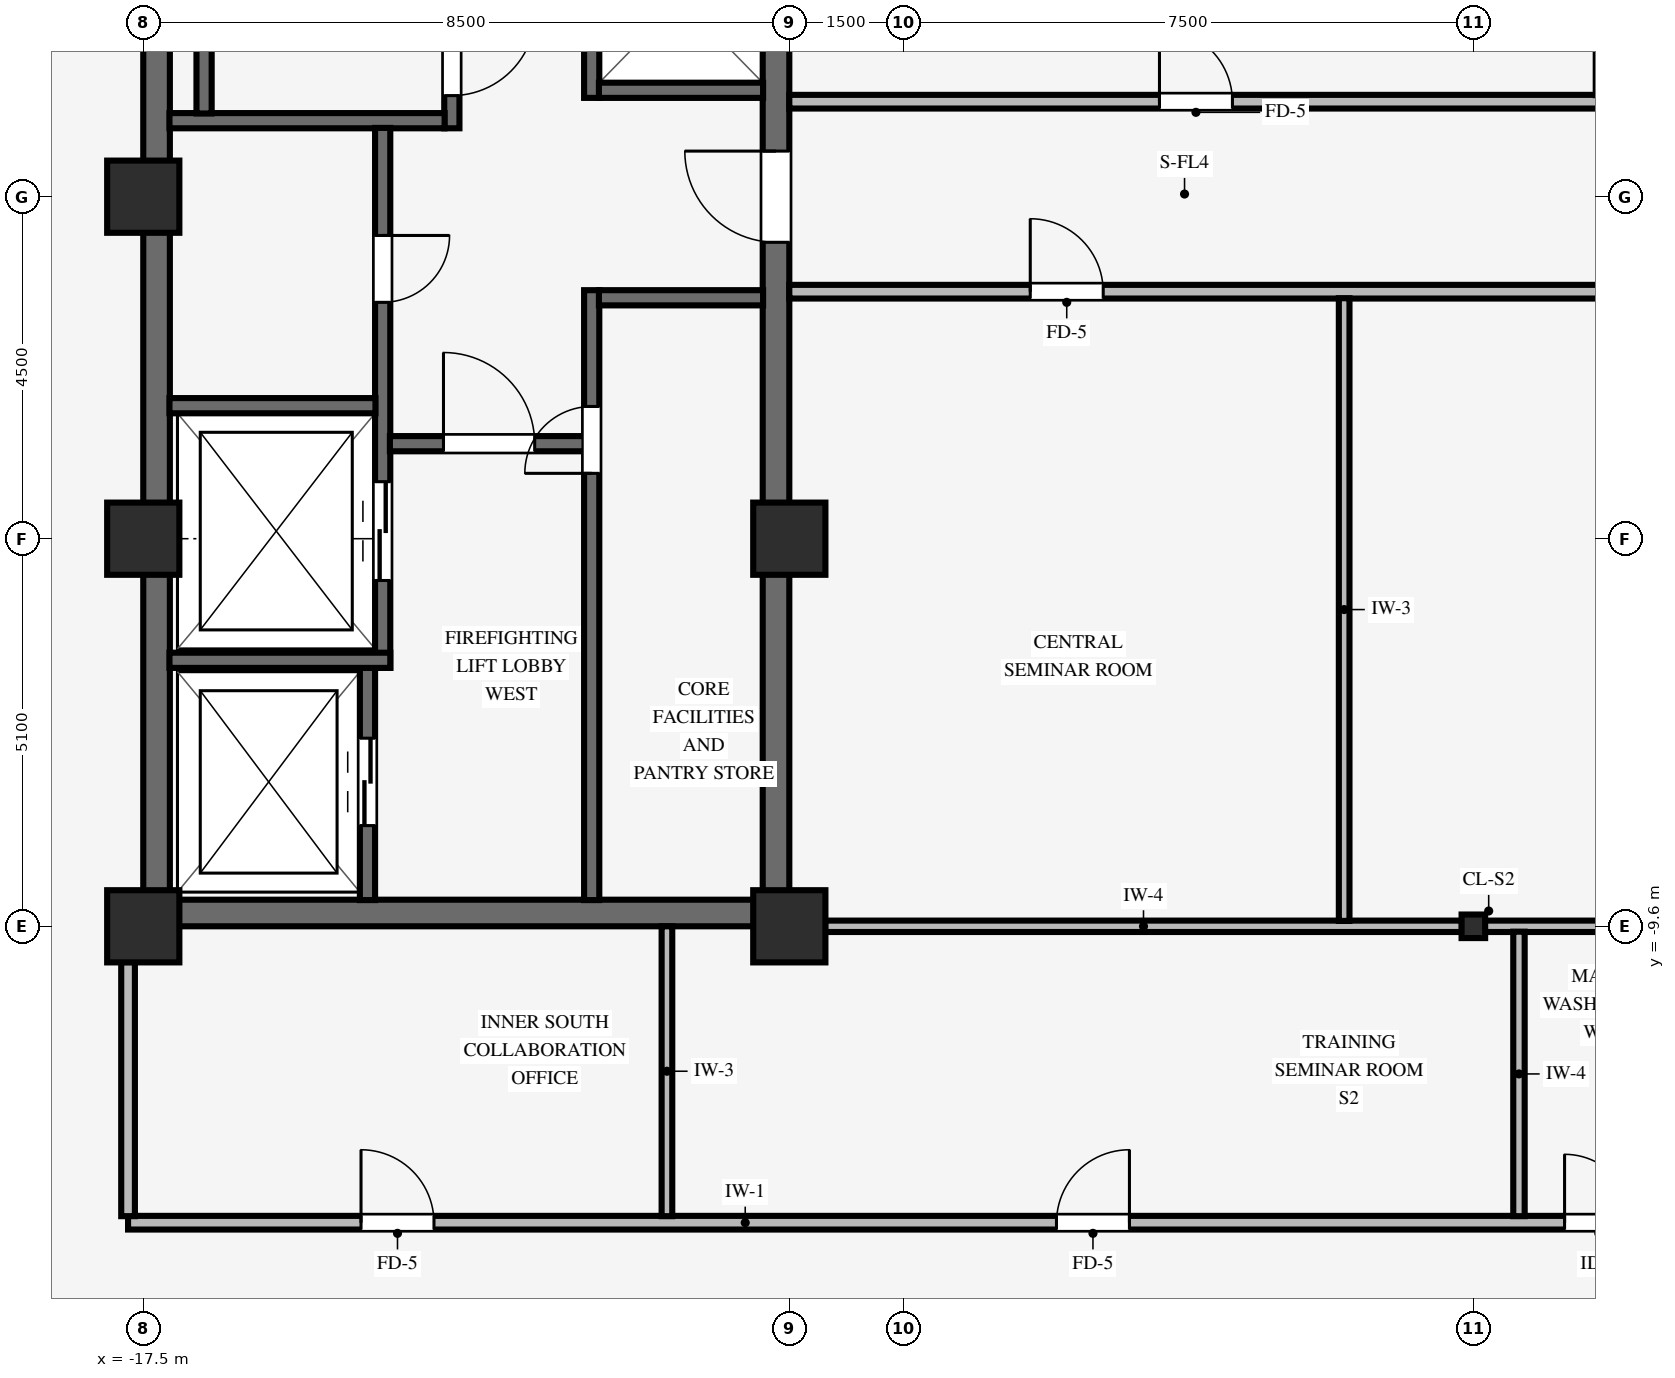
"""IFC4 building model, lengths in metres.
Left out: names, types, materials, properties, quantities, classifications, styles, units other than length and angle.
Written with IfcOpenShell. Run it as: python <this file> out.ifc"""

import sys

from ifc_helpers import new_model, si_unit, direction, frame, frame_2d, origin, origin_2d, place, context, subcontext, project, spatial, rectangle, i_section, extrude, source, transform, mapped, element, fill, save


model = new_model("IFC4")
c1 = context("Model", 3, precision=1e-05, world=origin(), true_north=direction((0.0, 1.0)))
c2 = subcontext(c1, "Body", "Model", "MODEL_VIEW")
j1 = project(units=[si_unit("LENGTHUNIT", "METRE"), si_unit("PLANEANGLEUNIT", "RADIAN")], contexts=[c1])
p1 = place(None, origin())
s1 = spatial("IfcSite", under=j1, at=p1, CompositionType="ELEMENT")
p2 = place(p1, origin())
s2 = spatial("IfcBuilding", under=s1, at=p2, CompositionType="ELEMENT")
p3 = place(p2, frame((0.0, 0.0, 216.45)))
s3 = spatial("IfcBuildingStorey", under=s2, at=p3, CompositionType="ELEMENT", Elevation=216.45)
p4 = place(p3, frame((-17.5, -9.425, 0.0), z_axis=(0.0, 0.0, 1.0), x_axis=(1.0, 0.0, 0.0)))
e1 = element("IfcWall", 1, at=p4, inside=s3, PredefinedType="SHEAR", context=c2, shape_type="SweptSolid", body=[
    extrude(rectangle(XDim=8.5, YDim=0.35, at=frame_2d((4.25, 0.0))), origin(), (0.0, 0.0, 1.0), 3.37),
])
p5 = place(p3, frame((-17.325, -9.255, 0.0), z_axis=(0.0, 0.0, 1.0), x_axis=(0.0, 1.0, 0.0)))
e2 = element("IfcWall", 2, at=p5, inside=s3, PredefinedType="SHEAR", context=c2, shape_type="SweptSolid", body=[
    extrude(rectangle(XDim=18.51, YDim=0.35, at=frame_2d((9.255, 0.0))), origin(), (0.0, 0.0, 1.0), 3.37),
])
p6 = place(p3, frame((-9.175, -9.255, 0.0), z_axis=(0.0, 0.0, 1.0), x_axis=(0.0, 1.0, 0.0)))
e3 = element("IfcWall", 3, at=p6, inside=s3, PredefinedType="SHEAR", context=c2, shape_type="SweptSolid", body=[
    extrude(rectangle(XDim=18.51, YDim=0.35, at=frame_2d((9.255, 0.0))), origin(), (0.0, 0.0, 1.0), 3.37),
])
p7 = place(p6, frame((8.655, 0.0, 0.0)))
e4 = element("IfcOpeningElement", 4, at=p7, cuts=e3, PredefinedType="OPENING", context=c2, shape_type="SweptSolid", body=[
    extrude(rectangle(XDim=1.2, YDim=2.15, at=frame_2d((0.6, 1.075))), frame((0.0, 0.185, 0.0), z_axis=(0.0, -1.0, 0.0), x_axis=(1.0, 0.0, 0.0)), (0.0, 0.0, 1.0), 0.37),
])
for number, where, z_axis, x_axis in (
    (5, (-17.5, -9.6, 0.0), (0.0, 0.0, 1.0), (1.0, 0.0, 0.0)),
    (6, (-17.5, -4.5, 0.0), (0.0, 0.0, 1.0), (1.0, 0.0, 0.0)),
    (7, (-9.0, -9.6, 0.0), (0.0, 0.0, 1.0), (1.0, 0.0, 0.0)),
    (8, (-9.0, -4.5, 0.0), (0.0, 0.0, 1.0), (1.0, 0.0, 0.0)),
    (9, (-17.5, 0.0, 0.0), (0.0, 0.0, 1.0), (1.0, 0.0, 0.0)),
):
    element("IfcColumn", number, at=place(p3, frame(where, z_axis=z_axis, x_axis=x_axis)), inside=s3, PredefinedType="COLUMN", context=c2, shape_type="SweptSolid", body=[
        extrude(rectangle(XDim=0.95, YDim=0.95, at=origin_2d()), origin(), (0.0, 0.0, 1.0), 3.37),
    ])
p8 = place(p3, frame((0.0, -9.6, 0.0), z_axis=(0.0, 0.0, 1.0), x_axis=(1.0, 0.0, 0.0)))
e10 = element("IfcColumn", 10, at=p8, inside=s3, PredefinedType="COLUMN", context=c2, shape_type="SweptSolid", body=[
    extrude(i_section(OverallWidth=0.31, OverallDepth=0.31, WebThickness=0.015, FlangeThickness=0.015, FilletRadius=0.015, at=origin_2d()), origin(), (0.0, 0.0, 1.0), 3.37),
])
p9 = place(p3, frame((-13.44, 0.9, 0.0), z_axis=(0.0, 0.0, 1.0), x_axis=(0.0, 1.0, 0.0)))
e11 = element("IfcWall", 11, at=p9, inside=s3, PredefinedType="SHEAR", context=c2, shape_type="SweptSolid", body=[
    extrude(rectangle(XDim=8.355, YDim=0.2, at=frame_2d((4.177, 0.0))), origin(), (0.0, 0.0, 1.0), 3.37),
])
p10 = place(p9, frame((1.53, 0.0, 0.0), z_axis=(0.0, 0.0, 1.0), x_axis=(-1.0, 0.0, 0.0)))
e12 = element("IfcOpeningElement", 12, at=p10, cuts=e11, PredefinedType="OPENING", context=c2, shape_type="SweptSolid", body=[
    extrude(rectangle(XDim=1.1, YDim=2.15, at=frame_2d((0.55, 1.075))), frame((0.0, 0.11, 0.0), z_axis=(0.0, -1.0, 0.0), x_axis=(1.0, 0.0, 0.0)), (0.0, 0.0, 1.0), 0.22),
])
p11 = place(p3, frame((-17.155, 1.0, 0.0), z_axis=(0.0, 0.0, 1.0), x_axis=(1.0, 0.0, 0.0)))
e13 = element("IfcWall", 13, at=p11, inside=s3, PredefinedType="SHEAR", context=c2, shape_type="SweptSolid", body=[
    extrude(rectangle(XDim=3.62, YDim=0.2, at=frame_2d((1.81, 0.0))), origin(), (0.0, 0.0, 1.0), 3.37),
])
p12 = place(p3, frame((-16.7, 1.095, 0.0), z_axis=(0.0, 0.0, 1.0), x_axis=(0.0, 1.0, 0.0)))
e14 = element("IfcWall", 14, at=p12, inside=s3, PredefinedType="SHEAR", context=c2, shape_type="SweptSolid", body=[
    extrude(rectangle(XDim=8.16, YDim=0.2, at=frame_2d((4.08, 0.0))), origin(), (0.0, 0.0, 1.0), 3.37),
])
p13 = place(p3, frame((-14.55, -9.255, 0.0), z_axis=(0.0, 0.0, 1.0), x_axis=(0.0, 1.0, 0.0)))
e15 = element("IfcWall", 15, at=p13, inside=s3, PredefinedType="SHEAR", context=c2, shape_type="SweptSolid", body=[
    extrude(rectangle(XDim=3.06, YDim=0.2, at=frame_2d((1.53, 0.0))), origin(), (0.0, 0.0, 1.0), 3.37),
])
p14 = place(p13, frame((0.98, 0.0, 0.0)))
e16 = element("IfcOpeningElement", 16, at=p14, cuts=e15, PredefinedType="OPENING", context=c2, shape_type="SweptSolid", body=[
    extrude(rectangle(XDim=1.15, YDim=2.15, at=frame_2d((0.575, 1.075))), frame((0.0, 0.11, 0.0), z_axis=(0.0, -1.0, 0.0), x_axis=(1.0, 0.0, 0.0)), (0.0, 0.0, 1.0), 0.22),
])
p15 = place(p3, frame((-14.35, -6.2, 0.0), z_axis=(0.0, 0.0, 1.0), x_axis=(0.0, 1.0, 0.0)))
e17 = element("IfcWall", 17, at=p15, inside=s3, PredefinedType="SHEAR", context=c2, shape_type="SweptSolid", body=[
    extrude(rectangle(XDim=7.105, YDim=0.2, at=frame_2d((3.552, 0.0))), origin(), (0.0, 0.0, 1.0), 3.37),
])
p16 = place(p15, frame((5.69, 0.0, 0.0), z_axis=(0.0, 0.0, 1.0), x_axis=(-1.0, 0.0, 0.0)))
e18 = element("IfcOpeningElement", 18, at=p16, cuts=e17, PredefinedType="OPENING", context=c2, shape_type="SweptSolid", body=[
    extrude(rectangle(XDim=0.88, YDim=2.1, at=frame_2d((0.44, 1.05))), frame((0.0, 0.11, 0.0), z_axis=(0.0, -1.0, 0.0), x_axis=(1.0, 0.0, 0.0)), (0.0, 0.0, 1.0), 0.22),
])
p17 = place(p15, frame((1.15, 0.0, 0.0)))
e19 = element("IfcOpeningElement", 19, at=p17, cuts=e17, PredefinedType="OPENING", context=c2, shape_type="SweptSolid", body=[
    extrude(rectangle(XDim=1.3, YDim=2.2, at=frame_2d((0.65, 1.1))), frame((0.0, 0.11, 0.0), z_axis=(0.0, -1.0, 0.0), x_axis=(1.0, 0.0, 0.0)), (0.0, 0.0, 1.0), 0.22),
])
p18 = place(p3, frame((-17.155, -6.1, 0.0), z_axis=(0.0, 0.0, 1.0), x_axis=(1.0, 0.0, 0.0)))
e20 = element("IfcWall", 20, at=p18, inside=s3, PredefinedType="SHEAR", context=c2, shape_type="SweptSolid", body=[
    extrude(rectangle(XDim=2.905, YDim=0.2, at=frame_2d((1.453, 0.0))), origin(), (0.0, 0.0, 1.0), 3.37),
])
p19 = place(p3, frame((-17.155, -2.75, 0.0), z_axis=(0.0, 0.0, 1.0), x_axis=(1.0, 0.0, 0.0)))
e21 = element("IfcWall", 21, at=p19, inside=s3, PredefinedType="SHEAR", context=c2, shape_type="SweptSolid", body=[
    extrude(rectangle(XDim=2.71, YDim=0.2, at=frame_2d((1.355, 0.0))), origin(), (0.0, 0.0, 1.0), 3.37),
])
p20 = place(p3, frame((-11.6, -9.255, 0.0), z_axis=(0.0, 0.0, 1.0), x_axis=(0.0, 1.0, 0.0)))
e22 = element("IfcWall", 22, at=p20, inside=s3, PredefinedType="SHEAR", context=c2, shape_type="SweptSolid", body=[
    extrude(rectangle(XDim=8.025, YDim=0.2, at=frame_2d((4.012, 0.0))), origin(), (0.0, 0.0, 1.0), 3.37),
])
p21 = place(p20, frame((5.615, 0.0, 0.0)))
e23 = element("IfcOpeningElement", 23, at=p21, cuts=e22, PredefinedType="OPENING", context=c2, shape_type="SweptSolid", body=[
    extrude(rectangle(XDim=0.88, YDim=2.1, at=frame_2d((0.44, 1.05))), frame((0.0, 0.11, 0.0), z_axis=(0.0, -1.0, 0.0), x_axis=(1.0, 0.0, 0.0)), (0.0, 0.0, 1.0), 0.22),
])
p22 = place(p3, frame((-14.255, -3.25, 0.0), z_axis=(0.0, 0.0, 1.0), x_axis=(1.0, 0.0, 0.0)))
e24 = element("IfcWall", 24, at=p22, inside=s3, PredefinedType="SHEAR", context=c2, shape_type="SweptSolid", body=[
    extrude(rectangle(XDim=2.56, YDim=0.2, at=frame_2d((1.28, 0.0))), origin(), (0.0, 0.0, 1.0), 3.37),
])
p23 = place(p22, frame((0.705, 0.0, 0.0)))
e25 = element("IfcOpeningElement", 25, at=p23, cuts=e24, PredefinedType="OPENING", context=c2, shape_type="SweptSolid", body=[
    extrude(rectangle(XDim=1.2, YDim=2.15, at=frame_2d((0.6, 1.075))), frame((0.0, 0.11, 0.0), z_axis=(0.0, -1.0, 0.0), x_axis=(1.0, 0.0, 0.0)), (0.0, 0.0, 1.0), 0.22),
])
p24 = place(p3, frame((-11.505, -1.33, 0.0), z_axis=(0.0, 0.0, 1.0), x_axis=(1.0, 0.0, 0.0)))
e26 = element("IfcWall", 26, at=p24, inside=s3, PredefinedType="SHEAR", context=c2, shape_type="SweptSolid", body=[
    extrude(rectangle(XDim=2.16, YDim=0.2, at=frame_2d((1.08, 0.0))), origin(), (0.0, 0.0, 1.0), 3.37),
])
p25 = place(p3, frame((-11.6, 1.3, 0.0), z_axis=(0.0, 0.0, 1.0), x_axis=(0.0, 1.0, 0.0)))
e27 = element("IfcWall", 27, at=p25, inside=s3, PredefinedType="SHEAR", context=c2, shape_type="SweptSolid", body=[
    extrude(rectangle(XDim=7.955, YDim=0.2, at=frame_2d((3.978, 0.0))), origin(), (0.0, 0.0, 1.0), 3.37),
])
p26 = place(p3, frame((-11.505, 1.4, 0.0), z_axis=(0.0, 0.0, 1.0), x_axis=(1.0, 0.0, 0.0)))
e28 = element("IfcWall", 28, at=p26, inside=s3, PredefinedType="SHEAR", context=c2, shape_type="SweptSolid", body=[
    extrude(rectangle(XDim=2.16, YDim=0.2, at=frame_2d((1.08, 0.0))), origin(), (0.0, 0.0, 1.0), 3.37),
])
p27 = place(p3, frame((-17.7, -13.5, 0.0), z_axis=(0.0, 0.0, 1.0), x_axis=(1.0, 0.0, 0.0)))
e29 = element("IfcWall", 29, at=p27, inside=s3, PredefinedType="PARTITIONING", context=c2, shape_type="SweptSolid", body=[
    extrude(rectangle(XDim=24.3, YDim=0.18, at=frame_2d((12.15, 0.0))), origin(), (0.0, 0.0, 1.0), 3.008),
])
p28 = place(p27, frame((12.215, 0.0, 0.0)))
e30 = element("IfcOpeningElement", 30, at=p28, cuts=e29, PredefinedType="OPENING", context=c2, shape_type="SweptSolid", body=[
    extrude(rectangle(XDim=0.96, YDim=2.1, at=frame_2d((0.48, 1.05))), frame((0.0, 0.1, 0.0), z_axis=(0.0, -1.0, 0.0), x_axis=(1.0, 0.0, 0.0)), (0.0, 0.0, 1.0), 0.2),
])
p29 = place(p27, frame((3.065, 0.0, 0.0)))
e31 = element("IfcOpeningElement", 31, at=p29, cuts=e29, PredefinedType="OPENING", context=c2, shape_type="SweptSolid", body=[
    extrude(rectangle(XDim=0.96, YDim=2.1, at=frame_2d((0.48, 1.05))), frame((0.0, 0.1, 0.0), z_axis=(0.0, -1.0, 0.0), x_axis=(1.0, 0.0, 0.0)), (0.0, 0.0, 1.0), 0.2),
])
p30 = place(p27, frame((18.9, 0.0, 0.0)))
e32 = element("IfcOpeningElement", 32, at=p30, cuts=e29, PredefinedType="OPENING", context=c2, shape_type="SweptSolid", body=[
    extrude(rectangle(XDim=0.9, YDim=2.1, at=frame_2d((0.45, 1.05))), frame((0.0, 0.1, 0.0), z_axis=(0.0, -1.0, 0.0), x_axis=(1.0, 0.0, 0.0)), (0.0, 0.0, 1.0), 0.2),
])
p31 = place(p27, frame((21.0, 0.0, 0.0)))
e33 = element("IfcOpeningElement", 33, at=p31, cuts=e29, PredefinedType="OPENING", context=c2, shape_type="SweptSolid", body=[
    extrude(rectangle(XDim=0.9, YDim=2.1, at=frame_2d((0.45, 1.05))), frame((0.0, 0.1, 0.0), z_axis=(0.0, -1.0, 0.0), x_axis=(1.0, 0.0, 0.0)), (0.0, 0.0, 1.0), 0.2),
])
p32 = place(p3, frame((-8.529, -9.6, 0.0), z_axis=(0.0, 0.0, 1.0), x_axis=(1.0, 0.0, 0.0)))
e34 = element("IfcWall", 34, at=p32, inside=s3, PredefinedType="PARTITIONING", context=c2, shape_type="SweptSolid", body=[
    extrude(rectangle(XDim=8.378, YDim=0.15, at=frame_2d((4.189, 0.0))), origin(), (0.0, 0.0, 1.0), 2.405),
])
p33 = place(p3, frame((0.151, -9.6, 0.0), z_axis=(0.0, 0.0, 1.0), x_axis=(1.0, 0.0, 0.0)))
e35 = element("IfcWall", 35, at=p33, inside=s3, PredefinedType="PARTITIONING", context=c2, shape_type="SweptSolid", body=[
    extrude(rectangle(XDim=6.363, YDim=0.15, at=frame_2d((3.182, 0.0))), origin(), (0.0, 0.0, 1.0), 2.405),
])
p34 = place(p3, frame((-9.0, -1.25, 0.0), z_axis=(0.0, 0.0, 1.0), x_axis=(1.0, 0.0, 0.0)))
e36 = element("IfcWall", 36, at=p34, inside=s3, PredefinedType="PARTITIONING", context=c2, shape_type="SweptSolid", body=[
    extrude(rectangle(XDim=15.6, YDim=0.18, at=frame_2d((7.8, 0.0))), origin(), (0.0, 0.0, 1.0), 3.36),
])
p35 = place(p34, frame((10.97, 0.0, 0.0)))
e37 = element("IfcOpeningElement", 37, at=p35, cuts=e36, PredefinedType="OPENING", context=c2, shape_type="SweptSolid", body=[
    extrude(rectangle(XDim=0.96, YDim=2.1, at=frame_2d((0.48, 1.05))), frame((0.0, 0.1, 0.0), z_axis=(0.0, -1.0, 0.0), x_axis=(1.0, 0.0, 0.0)), (0.0, 0.0, 1.0), 0.2),
])
p36 = place(p34, frame((3.17, 0.0, 0.0)))
e38 = element("IfcOpeningElement", 38, at=p36, cuts=e36, PredefinedType="OPENING", context=c2, shape_type="SweptSolid", body=[
    extrude(rectangle(XDim=0.96, YDim=2.1, at=frame_2d((0.48, 1.05))), frame((0.0, 0.1, 0.0), z_axis=(0.0, -1.0, 0.0), x_axis=(1.0, 0.0, 0.0)), (0.0, 0.0, 1.0), 0.2),
])
p37 = place(p3, frame((-9.0, 1.25, 0.0), z_axis=(0.0, 0.0, 1.0), x_axis=(1.0, 0.0, 0.0)))
e39 = element("IfcWall", 39, at=p37, inside=s3, PredefinedType="PARTITIONING", context=c2, shape_type="SweptSolid", body=[
    extrude(rectangle(XDim=15.6, YDim=0.18, at=frame_2d((7.8, 0.0))), origin(), (0.0, 0.0, 1.0), 3.36),
])
p38 = place(p37, frame((4.87, 0.0, 0.0)))
e40 = element("IfcOpeningElement", 40, at=p38, cuts=e39, PredefinedType="OPENING", context=c2, shape_type="SweptSolid", body=[
    extrude(rectangle(XDim=0.96, YDim=2.1, at=frame_2d((0.48, 1.05))), frame((0.0, 0.1, 0.0), z_axis=(0.0, -1.0, 0.0), x_axis=(1.0, 0.0, 0.0)), (0.0, 0.0, 1.0), 0.2),
])
p39 = place(p3, frame((-17.7, -13.414, 0.0), z_axis=(0.0, 0.0, 1.0), x_axis=(0.0, 1.0, 0.0)))
e41 = element("IfcWall", 41, at=p39, inside=s3, PredefinedType="PARTITIONING", context=c2, shape_type="SweptSolid", body=[
    extrude(rectangle(XDim=3.343, YDim=0.18, at=frame_2d((1.671, 0.0))), origin(), (0.0, 0.0, 1.0), 2.816),
])
p40 = place(p3, frame((-10.61, -13.414, 0.0), z_axis=(0.0, 0.0, 1.0), x_axis=(0.0, 1.0, 0.0)))
e42 = element("IfcWall", 42, at=p40, inside=s3, PredefinedType="PARTITIONING", context=c2, shape_type="SweptSolid", body=[
    extrude(rectangle(XDim=3.814, YDim=0.14, at=frame_2d((1.907, 0.0))), origin(), (0.0, 0.0, 1.0), 3.36),
])
p41 = place(p3, frame((-1.7, -9.529, 0.0), z_axis=(0.0, 0.0, 1.0), x_axis=(0.0, 1.0, 0.0)))
e43 = element("IfcWall", 43, at=p41, inside=s3, PredefinedType="PARTITIONING", context=c2, shape_type="SweptSolid", body=[
    extrude(rectangle(XDim=8.193, YDim=0.14, at=frame_2d((4.097, 0.0))), origin(), (0.0, 0.0, 1.0), 3.36),
])
p42 = place(p3, frame((0.6, -13.414, 0.0), z_axis=(0.0, 0.0, 1.0), x_axis=(0.0, 1.0, 0.0)))
e44 = element("IfcWall", 44, at=p42, inside=s3, PredefinedType="PARTITIONING", context=c2, shape_type="SweptSolid", body=[
    extrude(rectangle(XDim=3.743, YDim=0.15, at=frame_2d((1.872, 0.0))), origin(), (0.0, 0.0, 1.0), 3.36),
])
m1 = source(origin(), c2, "Body", "SweptSolid", [
    extrude(rectangle(XDim=1.1, YDim=2.15, at=frame_2d((0.55, 1.075))), frame((0.0, 0.025, 0.0), z_axis=(0.0, -1.0, 0.0), x_axis=(1.0, 0.0, 0.0)), (0.0, 0.0, 1.0), 0.05),
])
p43 = place(p10, origin())
e45 = element("IfcDoor", 45, at=p43, inside=s3, OperationType="SINGLE_SWING_LEFT", PredefinedType="DOOR", context=c2, shape_type="MappedRepresentation", body=[
    mapped(m1, transform((0.0, 0.0, 0.0), scale=1.0)),
])
fill(e12, e45)
m2 = source(origin(), c2, "Body", "SweptSolid", [
    extrude(rectangle(XDim=0.88, YDim=2.1, at=frame_2d((0.44, 1.05))), frame((0.0, 0.025, 0.0), z_axis=(0.0, -1.0, 0.0), x_axis=(1.0, 0.0, 0.0)), (0.0, 0.0, 1.0), 0.05),
])
p44 = place(p16, origin())
e46 = element("IfcDoor", 46, at=p44, inside=s3, OperationType="SINGLE_SWING_LEFT", PredefinedType="DOOR", context=c2, shape_type="MappedRepresentation", body=[
    mapped(m2, transform((0.0, 0.0, 0.0), scale=1.0)),
])
fill(e18, e46)
m3 = source(origin(), c2, "Body", "SweptSolid", [
    extrude(rectangle(XDim=1.2, YDim=2.15, at=frame_2d((0.6, 1.075))), frame((0.0, 0.025, 0.0), z_axis=(0.0, -1.0, 0.0), x_axis=(1.0, 0.0, 0.0)), (0.0, 0.0, 1.0), 0.05),
])
p45 = place(p23, origin())
e47 = element("IfcDoor", 47, at=p45, inside=s3, OperationType="SINGLE_SWING_LEFT", PredefinedType="DOOR", context=c2, shape_type="MappedRepresentation", body=[
    mapped(m3, transform((0.0, 0.0, 0.0), scale=1.0)),
])
fill(e25, e47)
p46 = place(p21, origin())
e48 = element("IfcDoor", 48, at=p46, inside=s3, OperationType="SINGLE_SWING_LEFT", PredefinedType="DOOR", context=c2, shape_type="MappedRepresentation", body=[
    mapped(m2, transform((0.0, 0.0, 0.0), scale=1.0)),
])
fill(e23, e48)
p47 = place(p7, origin())
e49 = element("IfcDoor", 49, at=p47, inside=s3, OperationType="SINGLE_SWING_RIGHT", PredefinedType="DOOR", context=c2, shape_type="MappedRepresentation", body=[
    mapped(m3, transform((0.0, 0.0, 0.0), scale=1.0)),
])
fill(e4, e49)
m4 = source(origin(), c2, "Body", "SweptSolid", [
    extrude(rectangle(XDim=1.15, YDim=2.15, at=frame_2d((0.575, 1.075))), frame((0.0, 0.025, 0.0), z_axis=(0.0, -1.0, 0.0), x_axis=(1.0, 0.0, 0.0)), (0.0, 0.0, 1.0), 0.05),
])
p48 = place(p14, origin())
e50 = element("IfcDoor", 50, at=p48, inside=s3, OperationType="DOUBLE_DOOR_SLIDING", PredefinedType="DOOR", context=c2, shape_type="MappedRepresentation", body=[
    mapped(m4, transform((0.0, 0.0, 0.0), scale=1.0)),
])
fill(e16, e50)
m5 = source(origin(), c2, "Body", "SweptSolid", [
    extrude(rectangle(XDim=1.3, YDim=2.2, at=frame_2d((0.65, 1.1))), frame((0.0, 0.025, 0.0), z_axis=(0.0, -1.0, 0.0), x_axis=(1.0, 0.0, 0.0)), (0.0, 0.0, 1.0), 0.05),
])
p49 = place(p17, origin())
e51 = element("IfcDoor", 51, at=p49, inside=s3, OperationType="DOUBLE_DOOR_SLIDING", PredefinedType="DOOR", context=c2, shape_type="MappedRepresentation", body=[
    mapped(m5, transform((0.0, 0.0, 0.0), scale=1.0)),
])
fill(e19, e51)
m6 = source(origin(), c2, "Body", "SweptSolid", [
    extrude(rectangle(XDim=0.96, YDim=2.1, at=frame_2d((0.48, 1.05))), frame((0.0, 0.025, 0.0), z_axis=(0.0, -1.0, 0.0), x_axis=(1.0, 0.0, 0.0)), (0.0, 0.0, 1.0), 0.05),
])
p50 = place(p28, origin())
e52 = element("IfcDoor", 52, at=p50, inside=s3, OperationType="SINGLE_SWING_RIGHT", PredefinedType="DOOR", context=c2, shape_type="MappedRepresentation", body=[
    mapped(m6, transform((0.0, 0.0, 0.0), scale=1.0)),
])
fill(e30, e52)
p51 = place(p38, origin())
e53 = element("IfcDoor", 53, at=p51, inside=s3, OperationType="SINGLE_SWING_LEFT", PredefinedType="DOOR", context=c2, shape_type="MappedRepresentation", body=[
    mapped(m6, transform((0.0, 0.0, 0.0), scale=1.0)),
])
fill(e40, e53)
p52 = place(p36, origin())
e54 = element("IfcDoor", 54, at=p52, inside=s3, OperationType="SINGLE_SWING_LEFT", PredefinedType="DOOR", context=c2, shape_type="MappedRepresentation", body=[
    mapped(m6, transform((0.0, 0.0, 0.0), scale=1.0)),
])
fill(e38, e54)
p53 = place(p29, origin())
e55 = element("IfcDoor", 55, at=p53, inside=s3, OperationType="SINGLE_SWING_LEFT", PredefinedType="DOOR", context=c2, shape_type="MappedRepresentation", body=[
    mapped(m6, transform((0.0, 0.0, 0.0), scale=1.0)),
])
fill(e31, e55)
m7 = source(origin(), c2, "Body", "SweptSolid", [
    extrude(rectangle(XDim=0.9, YDim=2.1, at=frame_2d((0.45, 1.05))), frame((0.0, 0.025, 0.0), z_axis=(0.0, -1.0, 0.0), x_axis=(1.0, 0.0, 0.0)), (0.0, 0.0, 1.0), 0.05),
])
p54 = place(p30, origin())
e56 = element("IfcDoor", 56, at=p54, inside=s3, OperationType="SINGLE_SWING_LEFT", PredefinedType="DOOR", context=c2, shape_type="MappedRepresentation", body=[
    mapped(m7, transform((0.0, 0.0, 0.0), scale=1.0)),
])
fill(e32, e56)
save(model, sys.argv[1])
